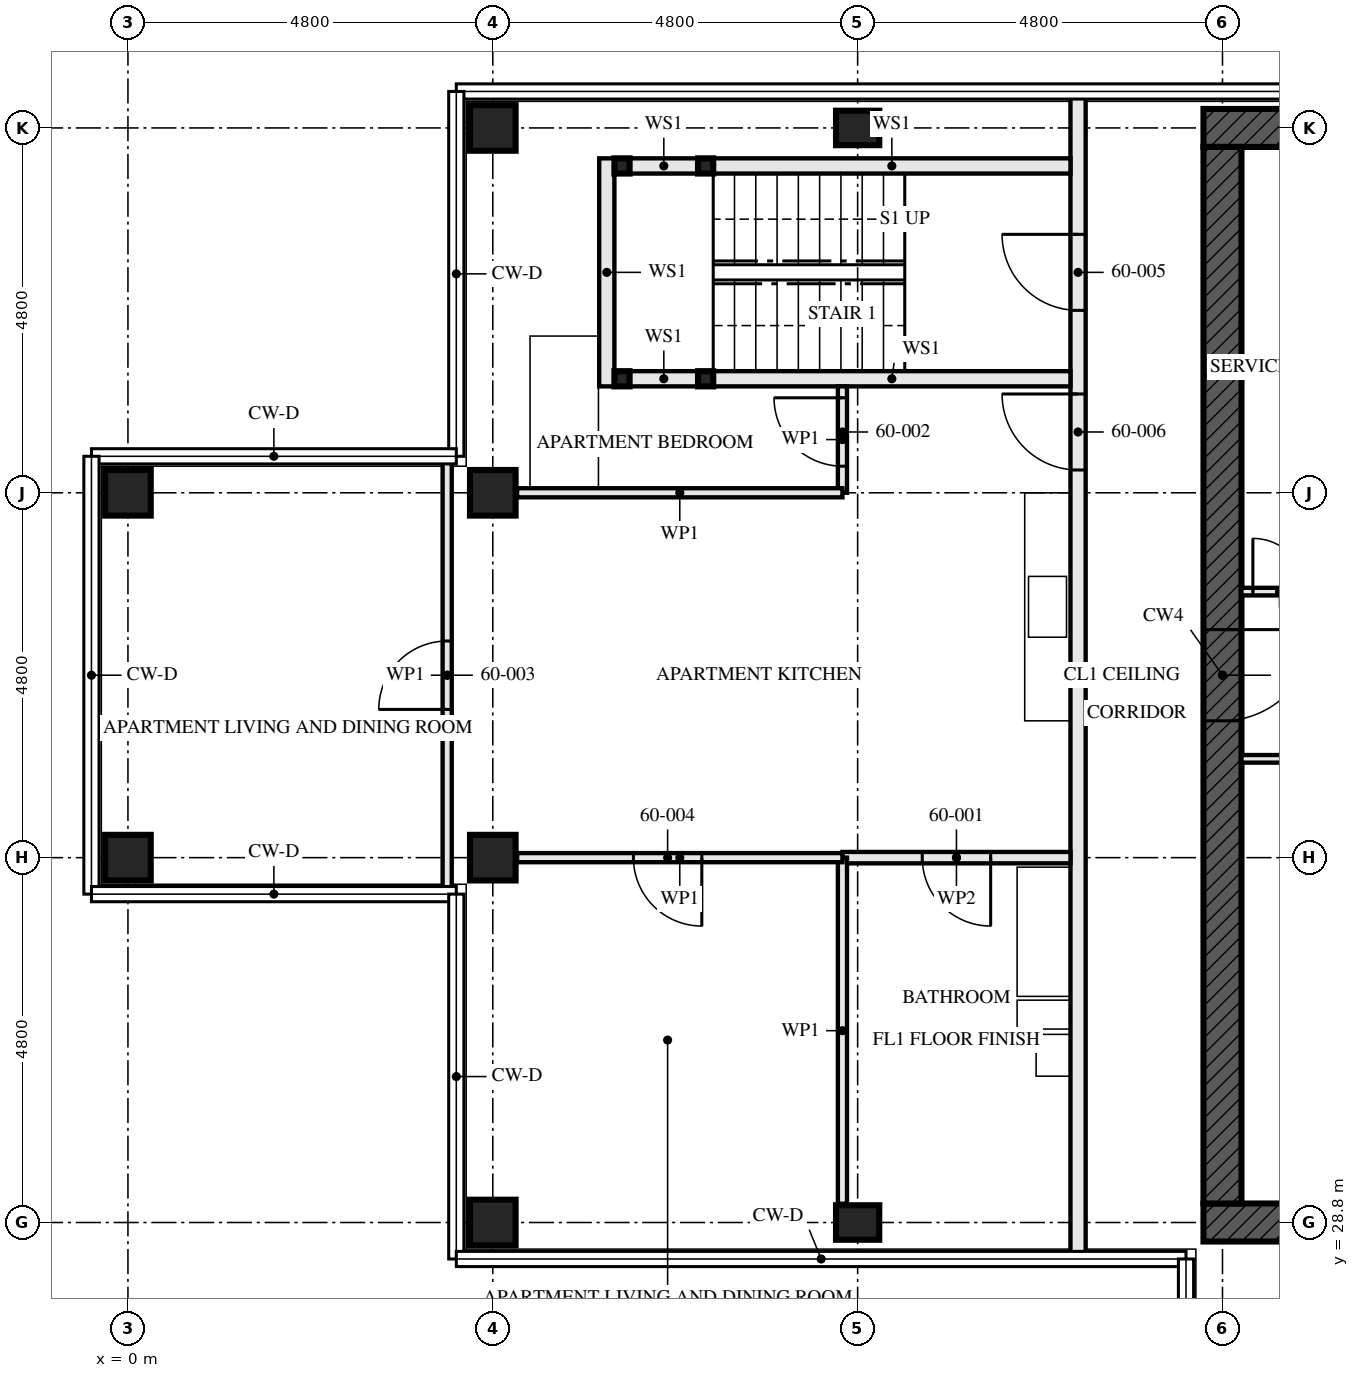
"""IFC4 building model, lengths in metres.
Left out: names, types, materials, properties, quantities, classifications, styles, units other than length and angle.
Written with IfcOpenShell. Run it as: python <this file> out.ifc"""

import sys

from ifc_helpers import new_model, si_unit, direction, frame, frame_2d, origin, origin_2d, place, context, subcontext, project, spatial, rectangle, hollow_rectangle, i_section, extrude, element, fill, save


model = new_model("IFC4")
c1 = context("Model", 3, precision=1e-05, world=origin(), true_north=direction((0.0, 1.0)))
c2 = subcontext(c1, "Body", "Model", "MODEL_VIEW")
j1 = project(units=[si_unit("LENGTHUNIT", "METRE"), si_unit("PLANEANGLEUNIT", "RADIAN")], contexts=[c1])
p1 = place(None, origin())
s1 = spatial("IfcSite", under=j1, at=p1, CompositionType="ELEMENT")
p2 = place(p1, origin())
s2 = spatial("IfcBuilding", under=s1, at=p2, CompositionType="ELEMENT")
p3 = place(p2, frame((0.0, 0.0, 219.0)))
s3 = spatial("IfcBuildingStorey", under=s2, at=p3, CompositionType="ELEMENT", Elevation=219.0)
for number, where, z_axis, x_axis in (
    (1, (0.0, 33.6, 0.0), (0.0, 0.0, 1.0), (0.0, 1.0, 0.0)),
    (2, (0.0, 38.4, 0.0), (0.0, 0.0, 1.0), (0.0, 1.0, 0.0)),
    (3, (4.8, 28.8, 0.0), (0.0, 0.0, 1.0), (0.0, 1.0, 0.0)),
    (4, (4.8, 33.6, 0.0), (0.0, 0.0, 1.0), (0.0, 1.0, 0.0)),
    (5, (4.8, 38.4, 0.0), (0.0, 0.0, 1.0), (0.0, 1.0, 0.0)),
    (6, (4.8, 43.2, 0.0), (0.0, 0.0, 1.0), (0.0, 1.0, 0.0)),
):
    element("IfcColumn", number, at=place(p3, frame(where, z_axis=z_axis, x_axis=x_axis)), inside=s3, PredefinedType="COLUMN", context=c2, shape_type="SweptSolid", body=[
        extrude(hollow_rectangle(XDim=0.6, YDim=0.6, WallThickness=0.05, at=origin_2d()), origin(), (0.0, 0.0, 1.0), 3.5),
    ])
for number, where, z_axis, x_axis in (
    (7, (9.6, 28.8, 0.0), (0.0, 0.0, 1.0), (0.0, 1.0, 0.0)),
    (8, (9.6, 43.2, 0.0), (0.0, 0.0, 1.0), (0.0, 1.0, 0.0)),
):
    element("IfcColumn", number, at=place(p3, frame(where, z_axis=z_axis, x_axis=x_axis)), inside=s3, PredefinedType="COLUMN", context=c2, shape_type="SweptSolid", body=[
        extrude(i_section(OverallWidth=0.454, OverallDepth=0.569, WebThickness=0.078, FlangeThickness=0.125, FilletRadius=0.015, at=origin_2d()), origin(), (0.0, 0.0, 1.0), 3.5),
    ])
p4 = place(p3, frame((14.15, 28.8, -0.17), z_axis=(0.0, 0.0, 1.0), x_axis=(1.0, 0.0, 0.0)))
e9 = element("IfcWall", 9, at=p4, inside=s3, PredefinedType="SHEAR", context=c2, shape_type="SweptSolid", body=[
    extrude(rectangle(XDim=14.9, YDim=0.5, at=frame_2d((7.45, 0.0))), origin(), (0.0, 0.0, 1.0), 3.5),
])
p5 = place(p4, frame((6.85, 0.0, 0.17)))
e10 = element("IfcOpeningElement", 10, at=p5, cuts=e9, PredefinedType="OPENING", context=c2, shape_type="SweptSolid", body=[
    extrude(rectangle(XDim=1.2, YDim=2.1, at=frame_2d((0.6, 1.05))), frame((0.0, 0.26, 0.0), z_axis=(0.0, -1.0, 0.0), x_axis=(1.0, 0.0, 0.0)), (0.0, 0.0, 1.0), 0.521),
])
p6 = place(p3, frame((29.05, 43.2, -0.17), z_axis=(0.0, 0.0, 1.0), x_axis=(-1.0, 0.0, 0.0)))
e11 = element("IfcWall", 11, at=p6, inside=s3, PredefinedType="SHEAR", context=c2, shape_type="SweptSolid", body=[
    extrude(rectangle(XDim=14.9, YDim=0.5, at=frame_2d((7.45, 0.0))), origin(), (0.0, 0.0, 1.0), 3.5),
])
p7 = place(p3, frame((14.4, 42.95, -0.17), z_axis=(0.0, 0.0, 1.0), x_axis=(0.0, -1.0, 0.0)))
e12 = element("IfcWall", 12, at=p7, inside=s3, PredefinedType="SHEAR", context=c2, shape_type="SweptSolid", body=[
    extrude(rectangle(XDim=13.9, YDim=0.5, at=frame_2d((6.95, 0.0))), origin(), (0.0, 0.0, 1.0), 3.5),
])
p8 = place(p7, frame((6.35, 0.0, 0.17)))
e13 = element("IfcOpeningElement", 13, at=p8, cuts=e12, PredefinedType="OPENING", context=c2, shape_type="SweptSolid", body=[
    extrude(rectangle(XDim=1.2, YDim=2.1, at=frame_2d((0.6, 1.05))), frame((0.0, 0.26, 0.0), z_axis=(0.0, -1.0, 0.0), x_axis=(1.0, 0.0, 0.0)), (0.0, 0.0, 1.0), 0.521),
])
for number, where, z_axis, x_axis in (
    (14, (6.5, 42.7, 0.0), (0.0, 0.0, 1.0), (1.0, 0.0, 0.0)),
    (15, (6.5, 39.9, 0.0), (0.0, 0.0, 1.0), (1.0, 0.0, 0.0)),
    (16, (7.6, 42.7, 0.0), (0.0, 0.0, 1.0), (1.0, 0.0, 0.0)),
    (17, (7.6, 39.9, 0.0), (0.0, 0.0, 1.0), (1.0, 0.0, 0.0)),
):
    element("IfcColumn", number, at=place(p3, frame(where, z_axis=z_axis, x_axis=x_axis)), inside=s3, PredefinedType="COLUMN", context=c2, shape_type="SweptSolid", body=[
        extrude(hollow_rectangle(XDim=0.2, YDim=0.2, WallThickness=0.008, at=origin_2d()), origin(), (0.0, 0.0, 1.0), 3.33),
    ])
p9 = place(p3, frame((6.6, 42.7, 0.0), z_axis=(0.0, 0.0, 1.0), x_axis=(1.0, 0.0, 0.0)))
e18 = element("IfcWall", 18, at=p9, inside=s3, PredefinedType="SOLIDWALL", context=c2, shape_type="SweptSolid", body=[
    extrude(rectangle(XDim=0.9, YDim=0.2, at=frame_2d((0.45, 0.0))), origin(), (0.0, 0.0, 1.0), 2.99),
])
p10 = place(p3, frame((7.7, 42.7, 0.0), z_axis=(0.0, 0.0, 1.0), x_axis=(1.0, 0.0, 0.0)))
e19 = element("IfcWall", 19, at=p10, inside=s3, PredefinedType="SOLIDWALL", context=c2, shape_type="SweptSolid", body=[
    extrude(rectangle(XDim=4.7, YDim=0.2, at=frame_2d((2.35, 0.0))), origin(), (0.0, 0.0, 1.0), 2.99),
])
p11 = place(p3, frame((6.6, 39.9, 0.0), z_axis=(0.0, 0.0, 1.0), x_axis=(1.0, 0.0, 0.0)))
e20 = element("IfcWall", 20, at=p11, inside=s3, PredefinedType="SOLIDWALL", context=c2, shape_type="SweptSolid", body=[
    extrude(rectangle(XDim=0.9, YDim=0.2, at=frame_2d((0.45, 0.0))), origin(), (0.0, 0.0, 1.0), 2.99),
])
p12 = place(p3, frame((7.7, 39.9, 0.0), z_axis=(0.0, 0.0, 1.0), x_axis=(1.0, 0.0, 0.0)))
e21 = element("IfcWall", 21, at=p12, inside=s3, PredefinedType="SOLIDWALL", context=c2, shape_type="SweptSolid", body=[
    extrude(rectangle(XDim=4.7, YDim=0.2, at=frame_2d((2.35, 0.0))), origin(), (0.0, 0.0, 1.0), 2.99),
])
p13 = place(p3, frame((6.3, 42.8, 0.0), z_axis=(0.0, 0.0, 1.0), x_axis=(0.0, -1.0, 0.0)))
e22 = element("IfcWall", 22, at=p13, inside=s3, PredefinedType="SOLIDWALL", context=c2, shape_type="SweptSolid", body=[
    extrude(rectangle(XDim=3.0, YDim=0.2, at=frame_2d((1.5, 0.0))), origin(), (0.0, 0.0, 1.0), 3.33),
])
p14 = place(p3, frame((9.4, 33.6, 0.0), z_axis=(0.0, 0.0, 1.0), x_axis=(1.0, 0.0, 0.0)))
e23 = element("IfcWall", 23, at=p14, inside=s3, PredefinedType="PARTITIONING", context=c2, shape_type="SweptSolid", body=[
    extrude(rectangle(XDim=3.0, YDim=0.15, at=frame_2d((1.5, 0.0))), origin(), (0.0, 0.0, 1.0), 2.55),
])
p15 = place(p14, frame((1.05, 0.0, 0.0)))
e24 = element("IfcOpeningElement", 24, at=p15, cuts=e23, PredefinedType="OPENING", context=c2, shape_type="SweptSolid", body=[
    extrude(rectangle(XDim=0.9, YDim=2.1, at=frame_2d((0.45, 1.05))), frame((0.0, 0.085, 0.0), z_axis=(0.0, -1.0, 0.0), x_axis=(1.0, 0.0, 0.0)), (0.0, 0.0, 1.0), 0.171),
])
p16 = place(p3, frame((9.4, 39.8, 0.0), z_axis=(0.0, 0.0, 1.0), x_axis=(0.0, -1.0, 0.0)))
e25 = element("IfcWall", 25, at=p16, inside=s3, PredefinedType="PARTITIONING", context=c2, shape_type="SweptSolid", body=[
    extrude(rectangle(XDim=1.4, YDim=0.12, at=frame_2d((0.7, 0.0))), origin(), (0.0, 0.0, 1.0), 3.33),
])
p17 = place(p16, frame((0.15, 0.0, 0.0)))
e26 = element("IfcOpeningElement", 26, at=p17, cuts=e25, PredefinedType="OPENING", context=c2, shape_type="SweptSolid", body=[
    extrude(rectangle(XDim=0.9, YDim=2.1, at=frame_2d((0.45, 1.05))), frame((0.0, 0.071, 0.0), z_axis=(0.0, -1.0, 0.0), x_axis=(1.0, 0.0, 0.0)), (0.0, 0.0, 1.0), 0.141),
])
p18 = place(p3, frame((4.2, 38.855, 0.0), z_axis=(0.0, 0.0, 1.0), x_axis=(0.0, -1.0, 0.0)))
e27 = element("IfcWall", 27, at=p18, inside=s3, PredefinedType="PARTITIONING", context=c2, shape_type="SweptSolid", body=[
    extrude(rectangle(XDim=5.71, YDim=0.12, at=frame_2d((2.855, 0.0))), origin(), (0.0, 0.0, 1.0), 2.32),
])
p19 = place(p18, frame((2.405, 0.0, 0.0)))
e28 = element("IfcOpeningElement", 28, at=p19, cuts=e27, PredefinedType="OPENING", context=c2, shape_type="SweptSolid", body=[
    extrude(rectangle(XDim=0.9, YDim=2.1, at=frame_2d((0.45, 1.05))), frame((0.0, 0.071, 0.0), z_axis=(0.0, -1.0, 0.0), x_axis=(1.0, 0.0, 0.0)), (0.0, 0.0, 1.0), 0.141),
])
p20 = place(p3, frame((9.4, 33.6, 0.0), z_axis=(0.0, 0.0, 1.0), x_axis=(0.0, -1.0, 0.0)))
e29 = element("IfcWall", 29, at=p20, inside=s3, PredefinedType="PARTITIONING", context=c2, shape_type="SweptSolid", body=[
    extrude(rectangle(XDim=4.553, YDim=0.12, at=frame_2d((2.276, 0.0))), origin(), (0.0, 0.0, 1.0), 3.33),
])
p21 = place(p3, frame((5.12, 38.4, 0.0), z_axis=(0.0, 0.0, 1.0), x_axis=(1.0, 0.0, 0.0)))
e30 = element("IfcWall", 30, at=p21, inside=s3, PredefinedType="PARTITIONING", context=c2, shape_type="SweptSolid", body=[
    extrude(rectangle(XDim=4.28, YDim=0.12, at=frame_2d((2.14, 0.0))), origin(), (0.0, 0.0, 1.0), 2.55),
])
p22 = place(p3, frame((5.12, 33.6, 0.0), z_axis=(0.0, 0.0, 1.0), x_axis=(1.0, 0.0, 0.0)))
e31 = element("IfcWall", 31, at=p22, inside=s3, PredefinedType="PARTITIONING", context=c2, shape_type="SweptSolid", body=[
    extrude(rectangle(XDim=4.28, YDim=0.12, at=frame_2d((2.14, 0.0))), origin(), (0.0, 0.0, 1.0), 2.55),
])
p23 = place(p22, frame((1.53, 0.0, 0.0)))
e32 = element("IfcOpeningElement", 32, at=p23, cuts=e31, PredefinedType="OPENING", context=c2, shape_type="SweptSolid", body=[
    extrude(rectangle(XDim=0.9, YDim=2.1, at=frame_2d((0.45, 1.05))), frame((0.0, 0.071, 0.0), z_axis=(0.0, -1.0, 0.0), x_axis=(1.0, 0.0, 0.0)), (0.0, 0.0, 1.0), 0.141),
])
p24 = place(p3, frame((12.5, 43.655, 0.0), z_axis=(0.0, 0.0, 1.0), x_axis=(0.0, -1.0, 0.0)))
e33 = element("IfcWall", 33, at=p24, inside=s3, PredefinedType="PARTITIONING", context=c2, shape_type="SweptSolid", body=[
    extrude(rectangle(XDim=15.31, YDim=0.2, at=frame_2d((7.655, 0.0))), origin(), (0.0, 0.0, 1.0), 2.32),
])
p25 = place(p24, frame((1.855, 0.0, 0.0)))
e34 = element("IfcOpeningElement", 34, at=p25, cuts=e33, PredefinedType="OPENING", context=c2, shape_type="SweptSolid", body=[
    extrude(rectangle(XDim=1.0, YDim=2.1, at=frame_2d((0.5, 1.05))), frame((0.0, 0.111, 0.0), z_axis=(0.0, -1.0, 0.0), x_axis=(1.0, 0.0, 0.0)), (0.0, 0.0, 1.0), 0.221),
])
p26 = place(p24, frame((3.955, 0.0, 0.0)))
e35 = element("IfcOpeningElement", 35, at=p26, cuts=e33, PredefinedType="OPENING", context=c2, shape_type="SweptSolid", body=[
    extrude(rectangle(XDim=1.0, YDim=2.1, at=frame_2d((0.5, 1.05))), frame((0.0, 0.111, 0.0), z_axis=(0.0, -1.0, 0.0), x_axis=(1.0, 0.0, 0.0)), (0.0, 0.0, 1.0), 0.221),
])
p27 = place(p3, frame((14.65, 34.9, 0.0), z_axis=(0.0, 0.0, 1.0), x_axis=(1.0, 0.0, 0.0)))
e36 = element("IfcWall", 36, at=p27, inside=s3, PredefinedType="SOLIDWALL", context=c2, shape_type="SweptSolid", body=[
    extrude(rectangle(XDim=5.9, YDim=0.1, at=frame_2d((2.95, 0.0))), origin(), (0.0, 0.0, 1.0), 3.33),
])
p28 = place(p27, frame((1.6, 0.0, 0.0)))
e37 = element("IfcOpeningElement", 37, at=p28, cuts=e36, PredefinedType="OPENING", context=c2, shape_type="SweptSolid", body=[
    extrude(rectangle(XDim=0.7, YDim=2.1, at=frame_2d((0.35, 1.05))), frame((0.0, 0.061, 0.0), z_axis=(0.0, -1.0, 0.0), x_axis=(1.0, 0.0, 0.0)), (0.0, 0.0, 1.0), 0.121),
])
p29 = place(p3, frame((14.65, 37.1, 0.0), z_axis=(0.0, 0.0, 1.0), x_axis=(1.0, 0.0, 0.0)))
e38 = element("IfcWall", 38, at=p29, inside=s3, PredefinedType="SOLIDWALL", context=c2, shape_type="SweptSolid", body=[
    extrude(rectangle(XDim=5.9, YDim=0.1, at=frame_2d((2.95, 0.0))), origin(), (0.0, 0.0, 1.0), 3.33),
])
p30 = place(p29, frame((0.15, 0.0, 0.0)))
e39 = element("IfcOpeningElement", 39, at=p30, cuts=e38, PredefinedType="OPENING", context=c2, shape_type="SweptSolid", body=[
    extrude(rectangle(XDim=0.7, YDim=2.1, at=frame_2d((0.35, 1.05))), frame((0.0, 0.061, 0.0), z_axis=(0.0, -1.0, 0.0), x_axis=(1.0, 0.0, 0.0)), (0.0, 0.0, 1.0), 0.121),
])
p31 = place(p29, frame((1.5, 0.0, 0.0)))
e40 = element("IfcOpeningElement", 40, at=p31, cuts=e38, PredefinedType="OPENING", context=c2, shape_type="SweptSolid", body=[
    extrude(rectangle(XDim=0.9, YDim=2.1, at=frame_2d((0.45, 1.05))), frame((0.0, 0.061, 0.0), z_axis=(0.0, -1.0, 0.0), x_axis=(1.0, 0.0, 0.0)), (0.0, 0.0, 1.0), 0.121),
])
p32 = place(p15, frame((0.9, 0.0, 0.0), z_axis=(0.0, 0.0, 1.0), x_axis=(-1.0, 0.0, 0.0)))
e41 = element("IfcDoor", 41, at=p32, inside=s3, OperationType="SINGLE_SWING_RIGHT", PredefinedType="DOOR", context=c2, shape_type="SweptSolid", body=[
    extrude(rectangle(XDim=0.9, YDim=2.1, at=frame_2d((0.45, 1.05))), frame((0.0, 0.022, 0.0), z_axis=(0.0, -1.0, 0.0), x_axis=(1.0, 0.0, 0.0)), (0.0, 0.0, 1.0), 0.044),
])
fill(e24, e41)
p33 = place(p17, frame((0.9, 0.0, 0.0), z_axis=(0.0, 0.0, 1.0), x_axis=(-1.0, 0.0, 0.0)))
e42 = element("IfcDoor", 42, at=p33, inside=s3, OperationType="SINGLE_SWING_LEFT", PredefinedType="DOOR", context=c2, shape_type="SweptSolid", body=[
    extrude(rectangle(XDim=0.9, YDim=2.1, at=frame_2d((0.45, 1.05))), frame((0.0, 0.022, 0.0), z_axis=(0.0, -1.0, 0.0), x_axis=(1.0, 0.0, 0.0)), (0.0, 0.0, 1.0), 0.044),
])
fill(e26, e42)
p34 = place(p19, frame((0.9, 0.0, 0.0), z_axis=(0.0, 0.0, 1.0), x_axis=(-1.0, 0.0, 0.0)))
e43 = element("IfcDoor", 43, at=p34, inside=s3, OperationType="SINGLE_SWING_RIGHT", PredefinedType="DOOR", context=c2, shape_type="SweptSolid", body=[
    extrude(rectangle(XDim=0.9, YDim=2.1, at=frame_2d((0.45, 1.05))), frame((0.0, 0.022, 0.0), z_axis=(0.0, -1.0, 0.0), x_axis=(1.0, 0.0, 0.0)), (0.0, 0.0, 1.0), 0.044),
])
fill(e28, e43)
p35 = place(p23, frame((0.9, 0.0, 0.0), z_axis=(0.0, 0.0, 1.0), x_axis=(-1.0, 0.0, 0.0)))
e44 = element("IfcDoor", 44, at=p35, inside=s3, OperationType="SINGLE_SWING_RIGHT", PredefinedType="DOOR", context=c2, shape_type="SweptSolid", body=[
    extrude(rectangle(XDim=0.9, YDim=2.1, at=frame_2d((0.45, 1.05))), frame((0.0, 0.022, 0.0), z_axis=(0.0, -1.0, 0.0), x_axis=(1.0, 0.0, 0.0)), (0.0, 0.0, 1.0), 0.044),
])
fill(e32, e44)
p36 = place(p25, frame((1.0, 0.0, 0.0), z_axis=(0.0, 0.0, 1.0), x_axis=(-1.0, 0.0, 0.0)))
e45 = element("IfcDoor", 45, at=p36, inside=s3, OperationType="SINGLE_SWING_LEFT", PredefinedType="DOOR", context=c2, shape_type="SweptSolid", body=[
    extrude(rectangle(XDim=1.0, YDim=2.1, at=frame_2d((0.5, 1.05))), frame((0.0, 0.032, 0.0), z_axis=(0.0, -1.0, 0.0), x_axis=(1.0, 0.0, 0.0)), (0.0, 0.0, 1.0), 0.064),
])
fill(e34, e45)
p37 = place(p26, frame((1.0, 0.0, 0.0), z_axis=(0.0, 0.0, 1.0), x_axis=(-1.0, 0.0, 0.0)))
e46 = element("IfcDoor", 46, at=p37, inside=s3, OperationType="SINGLE_SWING_LEFT", PredefinedType="DOOR", context=c2, shape_type="SweptSolid", body=[
    extrude(rectangle(XDim=1.0, YDim=2.1, at=frame_2d((0.5, 1.05))), frame((0.0, 0.027, 0.0), z_axis=(0.0, -1.0, 0.0), x_axis=(1.0, 0.0, 0.0)), (0.0, 0.0, 1.0), 0.054),
])
fill(e35, e46)
p38 = place(p30, origin())
e47 = element("IfcDoor", 47, at=p38, inside=s3, OperationType="SINGLE_SWING_RIGHT", PredefinedType="DOOR", context=c2, shape_type="SweptSolid", body=[
    extrude(rectangle(XDim=0.7, YDim=2.1, at=frame_2d((0.35, 1.05))), frame((0.0, 0.027, 0.0), z_axis=(0.0, -1.0, 0.0), x_axis=(1.0, 0.0, 0.0)), (0.0, 0.0, 1.0), 0.054),
])
fill(e39, e47)
p39 = place(p8, origin())
e48 = element("IfcDoor", 48, at=p39, inside=s3, OperationType="SINGLE_SWING_LEFT", PredefinedType="DOOR", context=c2, shape_type="SweptSolid", body=[
    extrude(rectangle(XDim=1.2, YDim=2.1, at=frame_2d((0.6, 1.05))), frame((0.0, 0.027, 0.0), z_axis=(0.0, -1.0, 0.0), x_axis=(1.0, 0.0, 0.0)), (0.0, 0.0, 1.0), 0.054),
])
fill(e13, e48)
save(model, sys.argv[1])
